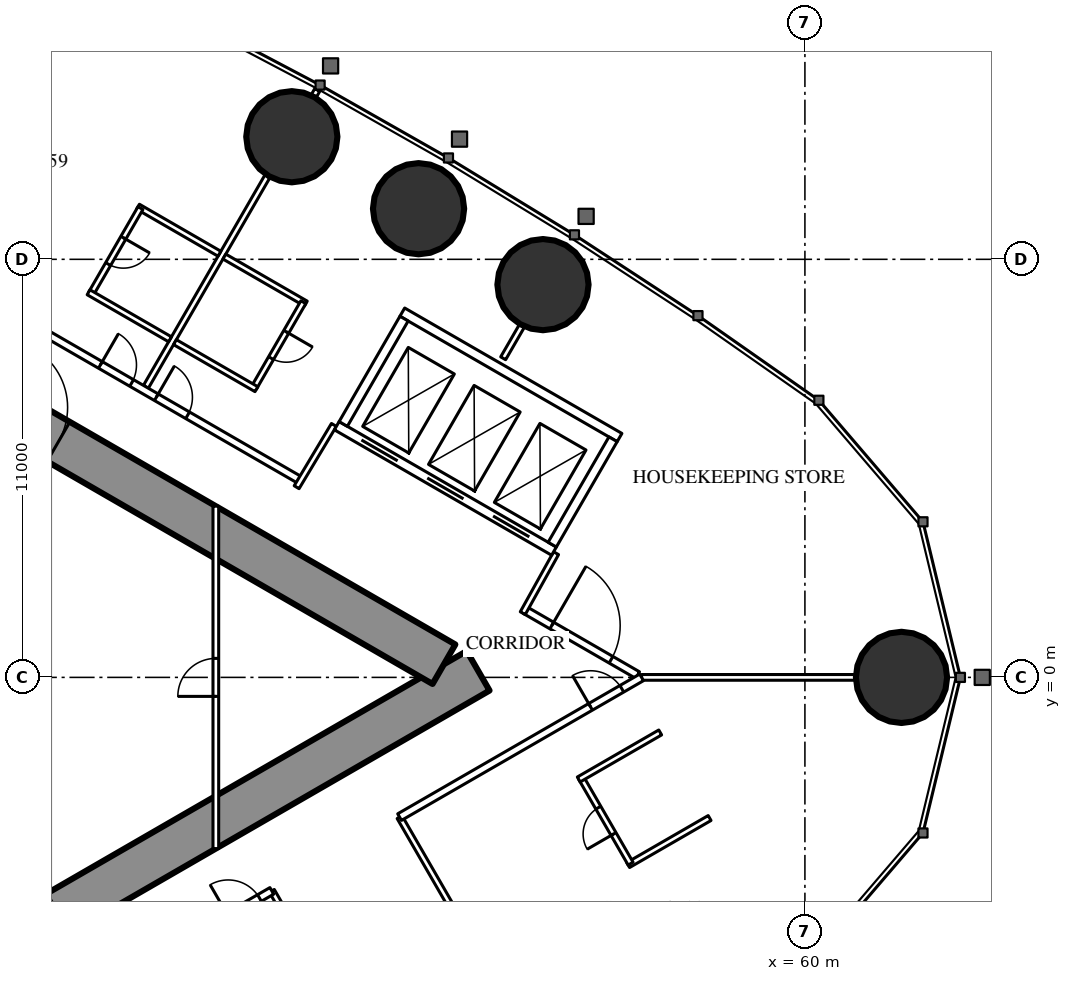
"""IFC4 building model, lengths in metres.
Left out: names, types, materials, properties, quantities, classifications, styles, units other than length and angle.
Written with IfcOpenShell. Run it as: python <this file> out.ifc"""

import sys

from ifc_helpers import new_model, si_unit, direction, frame, frame_2d, origin, origin_2d, place, context, subcontext, project, spatial, rectangle, circle, extrude, element, fill, save


model = new_model("IFC4")
c1 = context("Model", 3, precision=1e-05, world=origin(), true_north=direction((0.0, 1.0)))
c2 = subcontext(c1, "Body", "Model", "MODEL_VIEW")
j1 = project(units=[si_unit("LENGTHUNIT", "METRE"), si_unit("PLANEANGLEUNIT", "RADIAN")], contexts=[c1])
p1 = place(None, origin())
s1 = spatial("IfcSite", under=j1, at=p1, CompositionType="ELEMENT")
p2 = place(p1, origin())
s2 = spatial("IfcBuilding", under=s1, at=p2, CompositionType="ELEMENT")
p3 = place(p2, frame((0.0, 0.0, 229.7)))
s3 = spatial("IfcBuildingStorey", under=s2, at=p3, CompositionType="ELEMENT", Elevation=229.7)
for number, where, z_axis, x_axis in (
    (1, (62.542, 0.0, 0.0), (0.0, 0.0, 1.0), (1.0, 0.0, 0.0)),
    (2, (53.108, 10.334, 0.0), (0.0, 0.0, 1.0), (1.0, 0.0, 0.0)),
    (3, (49.834, 12.332, 0.0), (0.0, 0.0, 1.0), (1.0, 0.0, 0.0)),
    (4, (46.499, 14.226, 0.0), (0.0, 0.0, 1.0), (1.0, 0.0, 0.0)),
):
    element("IfcColumn", number, at=place(p3, frame(where, z_axis=z_axis, x_axis=x_axis)), inside=s3, PredefinedType="COLUMN", context=c2, shape_type="SweptSolid", body=[
        extrude(circle(Radius=1.2, at=origin_2d()), origin(), (0.0, 0.0, 1.0), 3.6),
    ])
p4 = place(p3, frame((27.2, -13.8, 0.0), z_axis=(0.0, 0.0, 1.0), x_axis=(0.866027159892, 0.499996958321, 0.0)))
e5 = element("IfcWall", 5, at=p4, inside=s3, PredefinedType="SHEAR", context=c2, shape_type="SweptSolid", body=[
    extrude(rectangle(XDim=27.947, YDim=1.2, at=frame_2d((13.973, 0.0))), origin(), (0.0, 0.0, 1.0), 3.6),
])
p5 = place(p4, frame((4.6, 0.0, 0.0)))
e6 = element("IfcOpeningElement", 6, at=p5, cuts=e5, PredefinedType="OPENING", context=c2, shape_type="SweptSolid", body=[
    extrude(rectangle(XDim=1.0, YDim=2.2, at=frame_2d((0.5, 1.1))), frame((0.0, 0.61, 0.0), z_axis=(0.0, -1.0, 0.0), x_axis=(1.0, 0.0, 0.0)), (0.0, 0.0, 1.0), 1.22),
])
p6 = place(p4, frame((13.395, 0.0, 0.0)))
e7 = element("IfcOpeningElement", 7, at=p6, cuts=e5, PredefinedType="OPENING", context=c2, shape_type="SweptSolid", body=[
    extrude(rectangle(XDim=1.8, YDim=2.2, at=frame_2d((0.9, 1.1))), frame((0.0, 0.61, 0.0), z_axis=(0.0, -1.0, 0.0), x_axis=(1.0, 0.0, 0.0)), (0.0, 0.0, 1.0), 1.22),
])
p7 = place(p3, frame((27.2, 13.8, 0.0), z_axis=(0.0, 0.0, 1.0), x_axis=(0.866024515034, -0.500001539357, 0.0)))
e8 = element("IfcWall", 8, at=p7, inside=s3, PredefinedType="SHEAR", context=c2, shape_type="SweptSolid", body=[
    extrude(rectangle(XDim=26.907, YDim=1.2, at=frame_2d((13.454, 0.0))), origin(), (0.0, 0.0, 1.0), 3.6),
])
p8 = place(p7, frame((4.6, 0.0, 0.0)))
e9 = element("IfcOpeningElement", 9, at=p8, cuts=e8, PredefinedType="OPENING", context=c2, shape_type="SweptSolid", body=[
    extrude(rectangle(XDim=1.0, YDim=2.2, at=frame_2d((0.5, 1.1))), frame((0.0, 0.61, 0.0), z_axis=(0.0, -1.0, 0.0), x_axis=(1.0, 0.0, 0.0)), (0.0, 0.0, 1.0), 1.22),
])
p9 = place(p7, frame((13.395, 0.0, 0.0)))
e10 = element("IfcOpeningElement", 10, at=p9, cuts=e8, PredefinedType="OPENING", context=c2, shape_type="SweptSolid", body=[
    extrude(rectangle(XDim=1.8, YDim=2.2, at=frame_2d((0.9, 1.1))), frame((0.0, 0.61, 0.0), z_axis=(0.0, -1.0, 0.0), x_axis=(1.0, 0.0, 0.0)), (0.0, 0.0, 1.0), 1.22),
])
p10 = place(p3, frame((45.973, -5.617, 0.0), z_axis=(0.0, 0.0, 1.0), x_axis=(0.499985856986, -0.866033569104, 0.0)))
e11 = element("IfcWall", 11, at=p10, inside=s3, PredefinedType="PARTITIONING", context=c2, shape_type="SweptSolid", body=[
    extrude(rectangle(XDim=6.526, YDim=0.15, at=frame_2d((3.263, 0.0))), origin(), (0.0, 0.0, 1.0), 2.45),
])
p11 = place(p3, frame((49.335, -3.676, 0.0), z_axis=(0.0, 0.0, 1.0), x_axis=(0.500000613642, -0.866025049498, 0.0)))
e12 = element("IfcWall", 12, at=p11, inside=s3, PredefinedType="PARTITIONING", context=c2, shape_type="SweptSolid", body=[
    extrude(rectangle(XDim=6.433, YDim=0.15, at=frame_2d((3.216, 0.0))), origin(), (0.0, 0.0, 1.0), 2.45),
])
p12 = place(p3, frame((42.66, 7.646, 0.0), z_axis=(0.0, 0.0, 1.0), x_axis=(0.499996592859, 0.866027370889, 0.0)))
e13 = element("IfcWall", 13, at=p12, inside=s3, PredefinedType="PARTITIONING", context=c2, shape_type="SweptSolid", body=[
    extrude(rectangle(XDim=6.398, YDim=0.15, at=frame_2d((3.199, 0.0))), origin(), (0.0, 0.0, 1.0), 2.45),
])
p13 = place(p3, frame((47.079, 15.3, 0.0), z_axis=(0.0, 0.0, 1.0), x_axis=(0.499212083968, 0.866479829667, 0.0)))
e14 = element("IfcWall", 14, at=p13, inside=s3, PredefinedType="PARTITIONING", context=c2, shape_type="SweptSolid", body=[
    extrude(rectangle(XDim=0.179, YDim=0.15, at=frame_2d((0.09, 0.0))), origin(), (0.0, 0.0, 1.0), 2.45),
])
p14 = place(p3, frame((55.702, 0.0, 0.0), z_axis=(0.0, 0.0, 1.0), x_axis=(1.0, 0.0, 0.0)))
e15 = element("IfcWall", 15, at=p14, inside=s3, PredefinedType="PARTITIONING", context=c2, shape_type="SweptSolid", body=[
    extrude(rectangle(XDim=5.619, YDim=0.15, at=frame_2d((2.81, 0.0))), origin(), (0.0, 0.0, 1.0), 2.45),
])
p15 = place(p3, frame((52.06, 8.396, 0.0), z_axis=(0.0, 0.0, 1.0), x_axis=(0.500095379624, 0.865970329329, 0.0)))
e16 = element("IfcWall", 16, at=p15, inside=s3, PredefinedType="PARTITIONING", context=c2, shape_type="SweptSolid", body=[
    extrude(rectangle(XDim=0.982, YDim=0.15, at=frame_2d((0.491, 0.0))), origin(), (0.0, 0.0, 1.0), 3.35),
])
p16 = place(p3, frame((28.959, 15.44, 0.0), z_axis=(0.0, 0.0, 1.0), x_axis=(0.866028936079, -0.499993881836, 0.0)))
e17 = element("IfcWall", 17, at=p16, inside=s3, PredefinedType="PARTITIONING", context=c2, shape_type="SweptSolid", body=[
    extrude(rectangle(XDim=20.503, YDim=0.2, at=frame_2d((10.251, 0.0))), origin(), (0.0, 0.0, 1.0), 3.35),
])
p17 = place(p16, frame((16.137, 0.0, 0.0)))
e18 = element("IfcOpeningElement", 18, at=p17, cuts=e17, PredefinedType="OPENING", context=c2, shape_type="SweptSolid", body=[
    extrude(rectangle(XDim=0.95, YDim=2.2, at=frame_2d((0.475, 1.1))), frame((0.0, 0.11, 0.0), z_axis=(0.0, -1.0, 0.0), x_axis=(1.0, 0.0, 0.0)), (0.0, 0.0, 1.0), 0.22),
])
p18 = place(p16, frame((14.437, 0.0, 0.0)))
e19 = element("IfcOpeningElement", 19, at=p18, cuts=e17, PredefinedType="OPENING", context=c2, shape_type="SweptSolid", body=[
    extrude(rectangle(XDim=0.95, YDim=2.2, at=frame_2d((0.475, 1.1))), frame((0.0, 0.11, 0.0), z_axis=(0.0, -1.0, 0.0), x_axis=(1.0, 0.0, 0.0)), (0.0, 0.0, 1.0), 0.22),
])
p19 = place(p16, frame((2.244, 0.0, 0.0)))
e20 = element("IfcOpeningElement", 20, at=p19, cuts=e17, PredefinedType="OPENING", context=c2, shape_type="SweptSolid", body=[
    extrude(rectangle(XDim=1.8, YDim=2.04, at=frame_2d((0.9, 1.02))), frame((0.0, 0.11, 0.0), z_axis=(0.0, -1.0, 0.0), x_axis=(1.0, 0.0, 0.0)), (0.0, 0.0, 1.0), 0.22),
])
p20 = place(p3, frame((52.639, 1.769, 0.0), z_axis=(0.0, 0.0, 1.0), x_axis=(0.866027340901, -0.4999966448, 0.0)))
e21 = element("IfcWall", 21, at=p20, inside=s3, PredefinedType="PARTITIONING", context=c2, shape_type="SweptSolid", body=[
    extrude(rectangle(XDim=3.417, YDim=0.2, at=frame_2d((1.708, 0.0))), origin(), (0.0, 0.0, 1.0), 3.35),
])
p21 = place(p20, frame((0.809, 0.0, 0.0)))
e22 = element("IfcOpeningElement", 22, at=p21, cuts=e21, PredefinedType="OPENING", context=c2, shape_type="SweptSolid", body=[
    extrude(rectangle(XDim=1.8, YDim=2.2, at=frame_2d((0.9, 1.1))), frame((0.0, 0.11, 0.0), z_axis=(0.0, -1.0, 0.0), x_axis=(1.0, 0.0, 0.0)), (0.0, 0.0, 1.0), 0.22),
])
p22 = place(p3, frame((47.606, 6.642, 0.0), z_axis=(0.0, 0.0, 1.0), x_axis=(-0.51353662755, -0.858067673418, 0.0)))
e23 = element("IfcWall", 23, at=p22, inside=s3, PredefinedType="PARTITIONING", context=c2, shape_type="SweptSolid", body=[
    extrude(rectangle(XDim=1.91, YDim=0.15, at=frame_2d((0.955, 0.0))), origin(), (0.0, 0.0, 1.0), 3.35),
])
p23 = place(p3, frame((52.576, 1.689, 0.0), z_axis=(0.0, 0.0, 1.0), x_axis=(0.485424724123, 0.874278466629, 0.0)))
e24 = element("IfcWall", 24, at=p23, inside=s3, PredefinedType="PARTITIONING", context=c2, shape_type="SweptSolid", body=[
    extrude(rectangle(XDim=1.805, YDim=0.15, at=frame_2d((0.903, 0.0))), origin(), (0.0, 0.0, 1.0), 3.35),
])
p24 = place(p3, frame((55.349, -4.938, 0.0), z_axis=(0.0, 0.0, 1.0), x_axis=(0.866006523861, 0.500032699561, 0.0)))
e25 = element("IfcWall", 25, at=p24, inside=s3, PredefinedType="PARTITIONING", context=c2, shape_type="SweptSolid", body=[
    extrude(rectangle(XDim=2.475, YDim=0.15, at=frame_2d((1.237, 0.0))), origin(), (0.0, 0.0, 1.0), 3.35),
])
p25 = place(p3, frame((54.114, -2.649, 0.0), z_axis=(0.0, 0.0, 1.0), x_axis=(0.500006934395, -0.866021400173, 0.0)))
e26 = element("IfcWall", 26, at=p25, inside=s3, PredefinedType="PARTITIONING", context=c2, shape_type="SweptSolid", body=[
    extrude(rectangle(XDim=2.6, YDim=0.15, at=frame_2d((1.3, 0.0))), origin(), (0.0, 0.0, 1.0), 3.35),
])
p26 = place(p25, frame((0.9, 0.0, 0.0)))
e27 = element("IfcOpeningElement", 27, at=p26, cuts=e26, PredefinedType="OPENING", context=c2, shape_type="SweptSolid", body=[
    extrude(rectangle(XDim=0.8, YDim=2.2, at=frame_2d((0.4, 1.1))), frame((0.0, 0.085, 0.0), z_axis=(0.0, -1.0, 0.0), x_axis=(1.0, 0.0, 0.0)), (0.0, 0.0, 1.0), 0.17),
])
for number, where, z_axis, x_axis in (
    (28, (54.049, -2.687, 0.0), (0.0, 0.0, 1.0), (0.866, 0.5, 0.0)),
    (29, (44.725, 11.072, 0.0), (0.0, 0.0, 1.0), (0.866, -0.5, 0.0)),
):
    element("IfcWall", number, at=place(p3, frame(where, z_axis=z_axis, x_axis=x_axis)), inside=s3, PredefinedType="PARTITIONING", context=c2, shape_type="SweptSolid", body=[
        extrude(rectangle(XDim=2.475, YDim=0.15, at=frame_2d((1.237, 0.0))), origin(), (0.0, 0.0, 1.0), 3.35),
    ])
p27 = place(p3, frame((45.503, 7.621, 0.0), z_axis=(0.0, 0.0, 1.0), x_axis=(0.500006934395, 0.866021400173, 0.0)))
e30 = element("IfcWall", 30, at=p27, inside=s3, PredefinedType="PARTITIONING", context=c2, shape_type="SweptSolid", body=[
    extrude(rectangle(XDim=2.6, YDim=0.15, at=frame_2d((1.3, 0.0))), origin(), (0.0, 0.0, 1.0), 3.35),
])
p28 = place(p27, frame((0.9, 0.0, 0.0)))
e31 = element("IfcOpeningElement", 31, at=p28, cuts=e30, PredefinedType="OPENING", context=c2, shape_type="SweptSolid", body=[
    extrude(rectangle(XDim=0.8, YDim=2.2, at=frame_2d((0.4, 1.1))), frame((0.0, 0.085, 0.0), z_axis=(0.0, -1.0, 0.0), x_axis=(1.0, 0.0, 0.0)), (0.0, 0.0, 1.0), 0.17),
])
p29 = place(p3, frame((43.425, 8.821, 0.0), z_axis=(0.0, 0.0, 1.0), x_axis=(0.866006523861, -0.500032699561, 0.0)))
e32 = element("IfcWall", 32, at=p29, inside=s3, PredefinedType="PARTITIONING", context=c2, shape_type="SweptSolid", body=[
    extrude(rectangle(XDim=2.475, YDim=0.15, at=frame_2d((1.237, 0.0))), origin(), (0.0, 0.0, 1.0), 2.5),
])
p30 = place(p3, frame((42.451, 12.385, 0.0), z_axis=(0.0, 0.0, 1.0), x_axis=(0.866031185235, -0.4999899861, 0.0)))
e33 = element("IfcWall", 33, at=p30, inside=s3, PredefinedType="PARTITIONING", context=c2, shape_type="SweptSolid", body=[
    extrude(rectangle(XDim=2.475, YDim=0.15, at=frame_2d((1.238, 0.0))), origin(), (0.0, 0.0, 1.0), 3.35),
])
p31 = place(p3, frame((41.216, 10.095, 0.0), z_axis=(0.0, 0.0, 1.0), x_axis=(0.499936506574, 0.866062058628, 0.0)))
e34 = element("IfcWall", 34, at=p31, inside=s3, PredefinedType="PARTITIONING", context=c2, shape_type="SweptSolid", body=[
    extrude(rectangle(XDim=2.6, YDim=0.15, at=frame_2d((1.3, 0.0))), origin(), (0.0, 0.0, 1.0), 3.35),
])
p32 = place(p31, frame((0.9, 0.0, 0.0)))
e35 = element("IfcOpeningElement", 35, at=p32, cuts=e34, PredefinedType="OPENING", context=c2, shape_type="SweptSolid", body=[
    extrude(rectangle(XDim=0.8, YDim=2.2, at=frame_2d((0.4, 1.1))), frame((0.0, 0.085, 0.0), z_axis=(0.0, -1.0, 0.0), x_axis=(1.0, 0.0, 0.0)), (0.0, 0.0, 1.0), 0.17),
])
p33 = place(p3, frame((41.151, 10.133, 0.0), z_axis=(0.0, 0.0, 1.0), x_axis=(0.866006523861, -0.500032699561, 0.0)))
e36 = element("IfcWall", 36, at=p33, inside=s3, PredefinedType="PARTITIONING", context=c2, shape_type="SweptSolid", body=[
    extrude(rectangle(XDim=2.475, YDim=0.15, at=frame_2d((1.237, 0.0))), origin(), (0.0, 0.0, 1.0), 2.5),
])
p34 = place(p3, frame((28.959, -15.44, 0.0), z_axis=(0.0, 0.0, 1.0), x_axis=(0.866025204199, 0.500000345692, 0.0)))
e37 = element("IfcWall", 37, at=p34, inside=s3, PredefinedType="PARTITIONING", context=c2, shape_type="SweptSolid", body=[
    extrude(rectangle(XDim=19.646, YDim=0.2, at=frame_2d((9.823, 0.0))), origin(), (0.0, 0.0, 1.0), 3.35),
])
p35 = place(p34, frame((1.494, 0.0, 0.0)))
e38 = element("IfcOpeningElement", 38, at=p35, cuts=e37, PredefinedType="OPENING", context=c2, shape_type="SweptSolid", body=[
    extrude(rectangle(XDim=1.8, YDim=2.04, at=frame_2d((0.9, 1.02))), frame((0.0, 0.11, 0.0), z_axis=(0.0, -1.0, 0.0), x_axis=(1.0, 0.0, 0.0)), (0.0, 0.0, 1.0), 0.22),
])
p36 = place(p34, frame((7.687, 0.0, 0.0)))
e39 = element("IfcOpeningElement", 39, at=p36, cuts=e37, PredefinedType="OPENING", context=c2, shape_type="SweptSolid", body=[
    extrude(rectangle(XDim=1.0, YDim=2.2, at=frame_2d((0.5, 1.1))), frame((0.0, 0.11, 0.0), z_axis=(0.0, -1.0, 0.0), x_axis=(1.0, 0.0, 0.0)), (0.0, 0.0, 1.0), 0.22),
])
p37 = place(p34, frame((18.321, 0.0, 0.0)))
e40 = element("IfcOpeningElement", 40, at=p37, cuts=e37, PredefinedType="OPENING", context=c2, shape_type="SweptSolid", body=[
    extrude(rectangle(XDim=0.95, YDim=2.2, at=frame_2d((0.475, 1.1))), frame((0.0, 0.11, 0.0), z_axis=(0.0, -1.0, 0.0), x_axis=(1.0, 0.0, 0.0)), (0.0, 0.0, 1.0), 0.22),
])
p38 = place(p3, frame((49.335, -3.676, 0.0), z_axis=(0.0, 0.0, 1.0), x_axis=(0.866021344046, 0.500007031608, 0.0)))
e41 = element("IfcWall", 41, at=p38, inside=s3, PredefinedType="PARTITIONING", context=c2, shape_type="SweptSolid", body=[
    extrude(rectangle(XDim=7.352, YDim=0.2, at=frame_2d((3.676, 0.0))), origin(), (0.0, 0.0, 1.0), 3.35),
])
p39 = place(p38, frame((5.802, 0.0, 0.0)))
e42 = element("IfcOpeningElement", 42, at=p39, cuts=e41, PredefinedType="OPENING", context=c2, shape_type="SweptSolid", body=[
    extrude(rectangle(XDim=0.95, YDim=2.2, at=frame_2d((0.475, 1.1))), frame((0.0, 0.11, 0.0), z_axis=(0.0, -1.0, 0.0), x_axis=(1.0, 0.0, 0.0)), (0.0, 0.0, 1.0), 0.22),
])
p40 = place(p3, frame((44.5, -4.505, 0.0), z_axis=(0.0, 0.0, 1.0), x_axis=(0.0, 1.0, 0.0)))
e43 = element("IfcWall", 43, at=p40, inside=s3, PredefinedType="PARTITIONING", context=c2, shape_type="SweptSolid", body=[
    extrude(rectangle(XDim=9.009, YDim=0.15, at=frame_2d((4.505, 0.0))), origin(), (0.0, 0.0, 1.0), 3.35),
])
p41 = place(p40, frame((4.005, 0.0, 0.0)))
e44 = element("IfcOpeningElement", 44, at=p41, cuts=e43, PredefinedType="OPENING", context=c2, shape_type="SweptSolid", body=[
    extrude(rectangle(XDim=1.0, YDim=2.2, at=frame_2d((0.5, 1.1))), frame((0.0, 0.085, 0.0), z_axis=(0.0, -1.0, 0.0), x_axis=(1.0, 0.0, 0.0)), (0.0, 0.0, 1.0), 0.17),
])
p42 = place(p3, frame((47.681, 6.622, 0.0), z_axis=(0.0, 0.0, 1.0), x_axis=(0.86603344179, -0.499986077507, 0.0)))
e45 = element("IfcWall", 45, at=p42, inside=s3, PredefinedType="PARTITIONING", context=c2, shape_type="SweptSolid", body=[
    extrude(rectangle(XDim=6.6, YDim=0.25, at=frame_2d((3.3, 0.0))), origin(), (0.0, 0.0, 1.0), 3.35),
])
p43 = place(p42, frame((0.75, 0.0, 0.0)))
e46 = element("IfcOpeningElement", 46, at=p43, cuts=e45, PredefinedType="OPENING", context=c2, shape_type="SweptSolid", body=[
    extrude(rectangle(XDim=1.1, YDim=2.2, at=frame_2d((0.55, 1.1))), frame((0.0, 0.135, 0.0), z_axis=(0.0, -1.0, 0.0), x_axis=(1.0, 0.0, 0.0)), (0.0, 0.0, 1.0), 0.27),
])
p44 = place(p42, frame((2.75, 0.0, 0.0)))
e47 = element("IfcOpeningElement", 47, at=p44, cuts=e45, PredefinedType="OPENING", context=c2, shape_type="SweptSolid", body=[
    extrude(rectangle(XDim=1.1, YDim=2.2, at=frame_2d((0.55, 1.1))), frame((0.0, 0.135, 0.0), z_axis=(0.0, -1.0, 0.0), x_axis=(1.0, 0.0, 0.0)), (0.0, 0.0, 1.0), 0.27),
])
p45 = place(p42, frame((4.75, 0.0, 0.0)))
e48 = element("IfcOpeningElement", 48, at=p45, cuts=e45, PredefinedType="OPENING", context=c2, shape_type="SweptSolid", body=[
    extrude(rectangle(XDim=1.1, YDim=2.2, at=frame_2d((0.55, 1.1))), frame((0.0, 0.135, 0.0), z_axis=(0.0, -1.0, 0.0), x_axis=(1.0, 0.0, 0.0)), (0.0, 0.0, 1.0), 0.27),
])
p46 = place(p3, frame((49.406, 9.611, 0.0), z_axis=(0.0, 0.0, 1.0), x_axis=(0.86603344179, -0.499986077507, 0.0)))
e49 = element("IfcWall", 49, at=p46, inside=s3, PredefinedType="PARTITIONING", context=c2, shape_type="SweptSolid", body=[
    extrude(rectangle(XDim=6.6, YDim=0.25, at=frame_2d((3.3, 0.0))), origin(), (0.0, 0.0, 1.0), 3.35),
])
p47 = place(p3, frame((47.852, 6.668, 0.0), z_axis=(0.0, 0.0, 1.0), x_axis=(0.499929347863, 0.866066190972, 0.0)))
e50 = element("IfcWall", 50, at=p47, inside=s3, PredefinedType="PARTITIONING", context=c2, shape_type="SweptSolid", body=[
    extrude(rectangle(XDim=3.201, YDim=0.25, at=frame_2d((1.6, 0.0))), origin(), (0.0, 0.0, 1.0), 3.35),
])
p48 = place(p3, frame((53.352, 3.493, 0.0), z_axis=(0.0, 0.0, 1.0), x_axis=(0.499872130319, 0.866099216793, 0.0)))
e51 = element("IfcWall", 51, at=p48, inside=s3, PredefinedType="PARTITIONING", context=c2, shape_type="SweptSolid", body=[
    extrude(rectangle(XDim=3.2, YDim=0.25, at=frame_2d((1.6, 0.0))), origin(), (0.0, 0.0, 1.0), 3.35),
])
p49 = place(p37, origin())
e52 = element("IfcDoor", 52, at=p49, inside=s3, OperationType="SINGLE_SWING_LEFT", PredefinedType="DOOR", context=c2, shape_type="SweptSolid", body=[
    extrude(rectangle(XDim=0.95, YDim=2.2, at=frame_2d((0.475, 1.1))), frame((0.0, 0.025, 0.0), z_axis=(0.0, -1.0, 0.0), x_axis=(1.0, 0.0, 0.0)), (0.0, 0.0, 1.0), 0.05),
])
fill(e40, e52)
p50 = place(p26, origin())
e53 = element("IfcDoor", 53, at=p50, inside=s3, OperationType="SINGLE_SWING_RIGHT", PredefinedType="DOOR", context=c2, shape_type="SweptSolid", body=[
    extrude(rectangle(XDim=0.8, YDim=2.2, at=frame_2d((0.4, 1.1))), frame((0.0, 0.025, 0.0), z_axis=(0.0, -1.0, 0.0), x_axis=(1.0, 0.0, 0.0)), (0.0, 0.0, 1.0), 0.05),
])
fill(e27, e53)
p51 = place(p39, origin())
e54 = element("IfcDoor", 54, at=p51, inside=s3, OperationType="SINGLE_SWING_LEFT", PredefinedType="DOOR", context=c2, shape_type="SweptSolid", body=[
    extrude(rectangle(XDim=0.95, YDim=2.2, at=frame_2d((0.475, 1.1))), frame((0.0, 0.025, 0.0), z_axis=(0.0, -1.0, 0.0), x_axis=(1.0, 0.0, 0.0)), (0.0, 0.0, 1.0), 0.05),
])
fill(e42, e54)
p52 = place(p28, origin())
e55 = element("IfcDoor", 55, at=p52, inside=s3, OperationType="SINGLE_SWING_RIGHT", PredefinedType="DOOR", context=c2, shape_type="SweptSolid", body=[
    extrude(rectangle(XDim=0.8, YDim=2.2, at=frame_2d((0.4, 1.1))), frame((0.0, 0.025, 0.0), z_axis=(0.0, -1.0, 0.0), x_axis=(1.0, 0.0, 0.0)), (0.0, 0.0, 1.0), 0.05),
])
fill(e31, e55)
p53 = place(p17, origin())
e56 = element("IfcDoor", 56, at=p53, inside=s3, OperationType="SINGLE_SWING_LEFT", PredefinedType="DOOR", context=c2, shape_type="SweptSolid", body=[
    extrude(rectangle(XDim=0.95, YDim=2.2, at=frame_2d((0.475, 1.1))), frame((0.0, 0.025, 0.0), z_axis=(0.0, -1.0, 0.0), x_axis=(1.0, 0.0, 0.0)), (0.0, 0.0, 1.0), 0.05),
])
fill(e18, e56)
p54 = place(p32, origin())
e57 = element("IfcDoor", 57, at=p54, inside=s3, OperationType="SINGLE_SWING_RIGHT", PredefinedType="DOOR", context=c2, shape_type="SweptSolid", body=[
    extrude(rectangle(XDim=0.8, YDim=2.2, at=frame_2d((0.4, 1.1))), frame((0.0, 0.025, 0.0), z_axis=(0.0, -1.0, 0.0), x_axis=(1.0, 0.0, 0.0)), (0.0, 0.0, 1.0), 0.05),
])
fill(e35, e57)
p55 = place(p18, origin())
e58 = element("IfcDoor", 58, at=p55, inside=s3, OperationType="SINGLE_SWING_LEFT", PredefinedType="DOOR", context=c2, shape_type="SweptSolid", body=[
    extrude(rectangle(XDim=0.95, YDim=2.2, at=frame_2d((0.475, 1.1))), frame((0.0, 0.025, 0.0), z_axis=(0.0, -1.0, 0.0), x_axis=(1.0, 0.0, 0.0)), (0.0, 0.0, 1.0), 0.05),
])
fill(e19, e58)
p56 = place(p21, origin())
e59 = element("IfcDoor", 59, at=p56, inside=s3, OperationType="DOUBLE_DOOR_SINGLE_SWING", PredefinedType="DOOR", context=c2, shape_type="SweptSolid", body=[
    extrude(rectangle(XDim=1.8, YDim=2.2, at=frame_2d((0.9, 1.1))), frame((0.0, 0.025, 0.0), z_axis=(0.0, -1.0, 0.0), x_axis=(1.0, 0.0, 0.0)), (0.0, 0.0, 1.0), 0.05),
])
fill(e22, e59)
p57 = place(p41, origin())
e60 = element("IfcDoor", 60, at=p57, inside=s3, OperationType="SINGLE_SWING_LEFT", PredefinedType="DOOR", context=c2, shape_type="SweptSolid", body=[
    extrude(rectangle(XDim=1.0, YDim=2.2, at=frame_2d((0.5, 1.1))), frame((0.0, 0.025, 0.0), z_axis=(0.0, -1.0, 0.0), x_axis=(1.0, 0.0, 0.0)), (0.0, 0.0, 1.0), 0.05),
])
fill(e44, e60)
p58 = place(p9, origin())
e61 = element("IfcDoor", 61, at=p58, inside=s3, OperationType="DOUBLE_DOOR_SINGLE_SWING", PredefinedType="DOOR", context=c2, shape_type="SweptSolid", body=[
    extrude(rectangle(XDim=1.8, YDim=2.2, at=frame_2d((0.9, 1.1))), frame((0.0, 0.025, 0.0), z_axis=(0.0, -1.0, 0.0), x_axis=(1.0, 0.0, 0.0)), (0.0, 0.0, 1.0), 0.05),
])
fill(e10, e61)
p59 = place(p43, origin())
e62 = element("IfcDoor", 62, at=p59, inside=s3, OperationType="DOUBLE_DOOR_SLIDING", PredefinedType="USERDEFINED", context=c2, shape_type="SweptSolid", body=[
    extrude(rectangle(XDim=1.1, YDim=2.2, at=frame_2d((0.55, 1.1))), frame((0.0, 0.025, 0.0), z_axis=(0.0, -1.0, 0.0), x_axis=(1.0, 0.0, 0.0)), (0.0, 0.0, 1.0), 0.05),
])
fill(e46, e62)
p60 = place(p44, origin())
e63 = element("IfcDoor", 63, at=p60, inside=s3, OperationType="DOUBLE_DOOR_SLIDING", PredefinedType="USERDEFINED", context=c2, shape_type="SweptSolid", body=[
    extrude(rectangle(XDim=1.1, YDim=2.2, at=frame_2d((0.55, 1.1))), frame((0.0, 0.025, 0.0), z_axis=(0.0, -1.0, 0.0), x_axis=(1.0, 0.0, 0.0)), (0.0, 0.0, 1.0), 0.05),
])
fill(e47, e63)
p61 = place(p45, origin())
e64 = element("IfcDoor", 64, at=p61, inside=s3, OperationType="DOUBLE_DOOR_SLIDING", PredefinedType="USERDEFINED", context=c2, shape_type="SweptSolid", body=[
    extrude(rectangle(XDim=1.1, YDim=2.2, at=frame_2d((0.55, 1.1))), frame((0.0, 0.025, 0.0), z_axis=(0.0, -1.0, 0.0), x_axis=(1.0, 0.0, 0.0)), (0.0, 0.0, 1.0), 0.05),
])
fill(e48, e64)
save(model, sys.argv[1])
